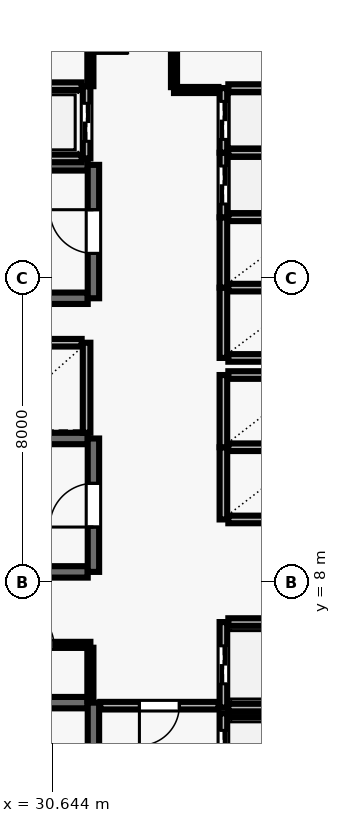
"""IFC4 building model, lengths in metres.
Left out: names, types, materials, properties, quantities, classifications, styles, units other than length and angle.
Written with IfcOpenShell. Run it as: python <this file> out.ifc"""

import sys

from ifc_helpers import new_model, si_unit, direction, frame, frame_2d, origin, place, context, subcontext, project, spatial, rectangle, extrude, element, fill, save


model = new_model("IFC4")
c1 = context("Model", 3, precision=1e-05, world=origin(), true_north=direction((0.0, 1.0)))
c2 = subcontext(c1, "Body", "Model", "MODEL_VIEW")
j1 = project(units=[si_unit("LENGTHUNIT", "METRE"), si_unit("PLANEANGLEUNIT", "RADIAN")], contexts=[c1])
p1 = place(None, origin())
s1 = spatial("IfcSite", under=j1, at=p1, CompositionType="ELEMENT")
p2 = place(p1, origin())
s2 = spatial("IfcBuilding", under=s1, at=p2, CompositionType="ELEMENT")
p3 = place(p2, frame((0.0, 0.0, 146.3)))
s3 = spatial("IfcBuildingStorey", under=s2, at=p3, CompositionType="ELEMENT", Elevation=146.3)
p4 = place(p3, frame((31.58, 4.83, 0.0), z_axis=(0.0, 0.0, 1.0), x_axis=(-1.0, 0.0, 0.0)))
e1 = element("IfcWall", 1, at=p4, inside=s3, PredefinedType="SHEAR", context=c2, shape_type="SweptSolid", body=[
    extrude(rectangle(XDim=8.36, YDim=0.3, at=frame_2d((4.18, 0.0))), origin(), (0.0, 0.0, 1.0), 3.69),
])
p5 = place(p3, frame((31.73, 0.96, 0.0), z_axis=(0.0, 0.0, 1.0), x_axis=(0.0, 1.0, 0.0)))
e2 = element("IfcWall", 2, at=p5, inside=s3, PredefinedType="SHEAR", context=c2, shape_type="SweptSolid", body=[
    extrude(rectangle(XDim=3.87, YDim=0.3, at=frame_2d((1.935, 0.0))), origin(), (0.0, 0.0, 1.0), 3.69),
])
p6 = place(p5, frame((1.54, 0.0, 0.0)))
e3 = element("IfcOpeningElement", 3, at=p6, cuts=e2, PredefinedType="OPENING", context=c2, shape_type="SweptSolid", body=[
    extrude(rectangle(XDim=1.15, YDim=2.15, at=frame_2d((0.575, 1.075))), frame((0.0, 0.16, 0.0), z_axis=(0.0, -1.0, 0.0), x_axis=(1.0, 0.0, 0.0)), (0.0, 0.0, 1.0), 0.32),
])
for number, where, z_axis, x_axis in (
    (4, (31.58, 18.98, 0.0), (0.0, 0.0, 1.0), (-1.0, 0.0, 0.0)),
    (5, (23.22, 15.47, 0.0), (0.0, 0.0, 1.0), (1.0, 0.0, 0.0)),
):
    element("IfcWall", number, at=place(p3, frame(where, z_axis=z_axis, x_axis=x_axis)), inside=s3, PredefinedType="SHEAR", context=c2, shape_type="SweptSolid", body=[
        extrude(rectangle(XDim=8.36, YDim=0.3, at=frame_2d((4.18, 0.0))), origin(), (0.0, 0.0, 1.0), 3.69),
    ])
p7 = place(p3, frame((31.73, 15.47, 0.0), z_axis=(0.0, 0.0, 1.0), x_axis=(0.0, 1.0, 0.0)))
e6 = element("IfcWall", 6, at=p7, inside=s3, PredefinedType="SHEAR", context=c2, shape_type="SweptSolid", body=[
    extrude(rectangle(XDim=3.51, YDim=0.3, at=frame_2d((1.755, 0.0))), origin(), (0.0, 0.0, 1.0), 3.69),
])
p8 = place(p7, frame((1.18, 0.0, 0.0)))
e7 = element("IfcOpeningElement", 7, at=p8, cuts=e6, PredefinedType="OPENING", context=c2, shape_type="SweptSolid", body=[
    extrude(rectangle(XDim=1.15, YDim=2.15, at=frame_2d((0.575, 1.075))), frame((0.0, 0.16, 0.0), z_axis=(0.0, -1.0, 0.0), x_axis=(1.0, 0.0, 0.0)), (0.0, 0.0, 1.0), 0.32),
])
for number, where, z_axis, x_axis in (
    (8, (31.58, 11.78, 0.0), (0.0, 0.0, 1.0), (-1.0, 0.0, 0.0)),
    (9, (23.22, 8.27, 0.0), (0.0, 0.0, 1.0), (1.0, 0.0, 0.0)),
):
    element("IfcWall", number, at=place(p3, frame(where, z_axis=z_axis, x_axis=x_axis)), inside=s3, PredefinedType="SHEAR", context=c2, shape_type="SweptSolid", body=[
        extrude(rectangle(XDim=8.36, YDim=0.3, at=frame_2d((4.18, 0.0))), origin(), (0.0, 0.0, 1.0), 3.69),
    ])
p9 = place(p3, frame((31.73, 8.27, 0.0), z_axis=(0.0, 0.0, 1.0), x_axis=(0.0, 1.0, 0.0)))
e10 = element("IfcWall", 10, at=p9, inside=s3, PredefinedType="SHEAR", context=c2, shape_type="SweptSolid", body=[
    extrude(rectangle(XDim=3.51, YDim=0.3, at=frame_2d((1.755, 0.0))), origin(), (0.0, 0.0, 1.0), 3.69),
])
p10 = place(p9, frame((1.18, 0.0, 0.0)))
e11 = element("IfcOpeningElement", 11, at=p10, cuts=e10, PredefinedType="OPENING", context=c2, shape_type="SweptSolid", body=[
    extrude(rectangle(XDim=1.15, YDim=2.15, at=frame_2d((0.575, 1.075))), frame((0.0, 0.16, 0.0), z_axis=(0.0, -1.0, 0.0), x_axis=(1.0, 0.0, 0.0)), (0.0, 0.0, 1.0), 0.32),
])
p11 = place(p3, frame((35.15, 4.55, 0.0), z_axis=(0.0, 0.0, 1.0), x_axis=(0.0, -1.0, 0.0)))
e12 = element("IfcWall", 12, at=p11, inside=s3, PredefinedType="SOLIDWALL", context=c2, shape_type="SweptSolid", body=[
    extrude(rectangle(XDim=2.1, YDim=0.2, at=frame_2d((1.05, 0.0))), origin(), (0.0, 0.0, 1.0), 3.69),
])
p12 = place(p11, frame((0.45, 0.0, 0.0)))
e13 = element("IfcOpeningElement", 13, at=p12, cuts=e12, PredefinedType="OPENING", context=c2, shape_type="SweptSolid", body=[
    extrude(rectangle(XDim=1.2, YDim=2.15, at=frame_2d((0.6, 1.075))), frame((0.0, 0.11, 0.0), z_axis=(0.0, -1.0, 0.0), x_axis=(1.0, 0.0, 0.0)), (0.0, 0.0, 1.0), 0.22),
])
p13 = place(p3, frame((37.42, 4.55, 0.0), z_axis=(0.0, 0.0, 1.0), x_axis=(-1.0, 0.0, 0.0)))
e14 = element("IfcWall", 14, at=p13, inside=s3, PredefinedType="SOLIDWALL", context=c2, shape_type="SweptSolid", body=[
    extrude(rectangle(XDim=2.14, YDim=0.2, at=frame_2d((1.07, 0.0))), origin(), (0.0, 0.0, 1.0), 3.69),
])
p14 = place(p3, frame((35.15, 6.95, 0.0), z_axis=(0.0, 0.0, 1.0), x_axis=(0.0, -1.0, 0.0)))
e15 = element("IfcWall", 15, at=p14, inside=s3, PredefinedType="SOLIDWALL", context=c2, shape_type="SweptSolid", body=[
    extrude(rectangle(XDim=2.25, YDim=0.2, at=frame_2d((1.125, 0.0))), origin(), (0.0, 0.0, 1.0), 3.69),
])
p15 = place(p14, frame((0.625, 0.0, 0.0)))
e16 = element("IfcOpeningElement", 16, at=p15, cuts=e15, PredefinedType="OPENING", context=c2, shape_type="SweptSolid", body=[
    extrude(rectangle(XDim=1.0, YDim=2.1, at=frame_2d((0.5, 1.05))), frame((0.0, 0.11, 0.0), z_axis=(0.0, -1.0, 0.0), x_axis=(1.0, 0.0, 0.0)), (0.0, 0.0, 1.0), 0.22),
])
for number, where, z_axis, x_axis in (
    (17, (35.28, 4.7, 0.0), (0.0, 0.0, 1.0), (1.0, 0.0, 0.0)),
    (18, (37.42, 6.95, 0.0), (0.0, 0.0, 1.0), (-1.0, 0.0, 0.0)),
):
    element("IfcWall", number, at=place(p3, frame(where, z_axis=z_axis, x_axis=x_axis)), inside=s3, PredefinedType="SOLIDWALL", context=c2, shape_type="SweptSolid", body=[
        extrude(rectangle(XDim=2.14, YDim=0.2, at=frame_2d((1.07, 0.0))), origin(), (0.0, 0.0, 1.0), 3.69),
    ])
p16 = place(p3, frame((35.15, 11.55, 0.0), z_axis=(0.0, 0.0, 1.0), x_axis=(0.0, -1.0, 0.0)))
e19 = element("IfcWall", 19, at=p16, inside=s3, PredefinedType="SOLIDWALL", context=c2, shape_type="SweptSolid", body=[
    extrude(rectangle(XDim=1.9, YDim=0.2, at=frame_2d((0.95, 0.0))), origin(), (0.0, 0.0, 1.0), 3.69),
])
for number, where, z_axis, x_axis in (
    (20, (35.28, 9.65, 0.0), (0.0, 0.0, 1.0), (1.0, 0.0, 0.0)),
    (21, (37.42, 11.55, 0.0), (0.0, 0.0, 1.0), (-1.0, 0.0, 0.0)),
):
    element("IfcWall", number, at=place(p3, frame(where, z_axis=z_axis, x_axis=x_axis)), inside=s3, PredefinedType="SOLIDWALL", context=c2, shape_type="SweptSolid", body=[
        extrude(rectangle(XDim=2.14, YDim=0.2, at=frame_2d((1.07, 0.0))), origin(), (0.0, 0.0, 1.0), 3.69),
    ])
p17 = place(p3, frame((35.15, 13.45, 0.0), z_axis=(0.0, 0.0, 1.0), x_axis=(0.0, -1.0, 0.0)))
e22 = element("IfcWall", 22, at=p17, inside=s3, PredefinedType="SOLIDWALL", context=c2, shape_type="SweptSolid", body=[
    extrude(rectangle(XDim=1.9, YDim=0.2, at=frame_2d((0.95, 0.0))), origin(), (0.0, 0.0, 1.0), 3.69),
])
p18 = place(p3, frame((37.42, 13.45, 0.0), z_axis=(0.0, 0.0, 1.0), x_axis=(-1.0, 0.0, 0.0)))
e23 = element("IfcWall", 23, at=p18, inside=s3, PredefinedType="SOLIDWALL", context=c2, shape_type="SweptSolid", body=[
    extrude(rectangle(XDim=2.14, YDim=0.2, at=frame_2d((1.07, 0.0))), origin(), (0.0, 0.0, 1.0), 3.69),
])
p19 = place(p3, frame((31.55, 11.93, 0.0), z_axis=(0.0, 0.0, 1.0), x_axis=(0.0, 1.0, 0.0)))
e24 = element("IfcWall", 24, at=p19, inside=s3, PredefinedType="SOLIDWALL", context=c2, shape_type="SweptSolid", body=[
    extrude(rectangle(XDim=2.37, YDim=0.2, at=frame_2d((1.185, 0.0))), origin(), (0.0, 0.0, 1.0), 3.69),
])
p20 = place(p3, frame((31.42, 14.3, 0.0), z_axis=(0.0, 0.0, 1.0), x_axis=(-1.0, 0.0, 0.0)))
e25 = element("IfcWall", 25, at=p20, inside=s3, PredefinedType="SOLIDWALL", context=c2, shape_type="SweptSolid", body=[
    extrude(rectangle(XDim=2.44, YDim=0.2, at=frame_2d((1.22, 0.0))), origin(), (0.0, 0.0, 1.0), 3.69),
])
p21 = place(p3, frame((35.15, 15.75, 0.0), z_axis=(0.0, 0.0, 1.0), x_axis=(0.0, -1.0, 0.0)))
e26 = element("IfcWall", 26, at=p21, inside=s3, PredefinedType="SOLIDWALL", context=c2, shape_type="SweptSolid", body=[
    extrude(rectangle(XDim=1.85, YDim=0.2, at=frame_2d((0.925, 0.0))), origin(), (0.0, 0.0, 1.0), 3.69),
])
for number, where, z_axis, x_axis in (
    (27, (35.28, 13.9, 0.0), (0.0, 0.0, 1.0), (1.0, 0.0, 0.0)),
    (28, (37.42, 15.75, 0.0), (0.0, 0.0, 1.0), (-1.0, 0.0, 0.0)),
):
    element("IfcWall", number, at=place(p3, frame(where, z_axis=z_axis, x_axis=x_axis)), inside=s3, PredefinedType="SOLIDWALL", context=c2, shape_type="SweptSolid", body=[
        extrude(rectangle(XDim=2.14, YDim=0.2, at=frame_2d((1.07, 0.0))), origin(), (0.0, 0.0, 1.0), 3.69),
    ])
p22 = place(p3, frame((35.15, 17.6, 0.0), z_axis=(0.0, 0.0, 1.0), x_axis=(0.0, -1.0, 0.0)))
e29 = element("IfcWall", 29, at=p22, inside=s3, PredefinedType="SOLIDWALL", context=c2, shape_type="SweptSolid", body=[
    extrude(rectangle(XDim=1.85, YDim=0.2, at=frame_2d((0.925, 0.0))), origin(), (0.0, 0.0, 1.0), 3.69),
])
p23 = place(p3, frame((37.42, 17.6, 0.0), z_axis=(0.0, 0.0, 1.0), x_axis=(-1.0, 0.0, 0.0)))
e30 = element("IfcWall", 30, at=p23, inside=s3, PredefinedType="SOLIDWALL", context=c2, shape_type="SweptSolid", body=[
    extrude(rectangle(XDim=2.14, YDim=0.2, at=frame_2d((1.07, 0.0))), origin(), (0.0, 0.0, 1.0), 3.69),
])
p24 = place(p3, frame((35.15, 19.3, 0.0), z_axis=(0.0, 0.0, 1.0), x_axis=(0.0, -1.0, 0.0)))
e31 = element("IfcWall", 31, at=p24, inside=s3, PredefinedType="SOLIDWALL", context=c2, shape_type="SweptSolid", body=[
    extrude(rectangle(XDim=1.7, YDim=0.2, at=frame_2d((0.85, 0.0))), origin(), (0.0, 0.0, 1.0), 3.69),
])
p25 = place(p24, frame((0.35, 0.0, 0.0)))
e32 = element("IfcOpeningElement", 32, at=p25, cuts=e31, PredefinedType="OPENING", context=c2, shape_type="SweptSolid", body=[
    extrude(rectangle(XDim=1.0, YDim=2.1, at=frame_2d((0.5, 1.05))), frame((0.0, 0.11, 0.0), z_axis=(0.0, -1.0, 0.0), x_axis=(1.0, 0.0, 0.0)), (0.0, 0.0, 1.0), 0.22),
])
p26 = place(p3, frame((37.42, 19.3, 0.0), z_axis=(0.0, 0.0, 1.0), x_axis=(-1.0, 0.0, 0.0)))
e33 = element("IfcWall", 33, at=p26, inside=s3, PredefinedType="SOLIDWALL", context=c2, shape_type="SweptSolid", body=[
    extrude(rectangle(XDim=2.14, YDim=0.2, at=frame_2d((1.07, 0.0))), origin(), (0.0, 0.0, 1.0), 3.69),
])
p27 = place(p3, frame((35.15, 21.0, 0.0), z_axis=(0.0, 0.0, 1.0), x_axis=(0.0, -1.0, 0.0)))
e34 = element("IfcWall", 34, at=p27, inside=s3, PredefinedType="SOLIDWALL", context=c2, shape_type="SweptSolid", body=[
    extrude(rectangle(XDim=1.7, YDim=0.2, at=frame_2d((0.85, 0.0))), origin(), (0.0, 0.0, 1.0), 3.69),
])
p28 = place(p27, frame((0.35, 0.0, 0.0)))
e35 = element("IfcOpeningElement", 35, at=p28, cuts=e34, PredefinedType="OPENING", context=c2, shape_type="SweptSolid", body=[
    extrude(rectangle(XDim=1.0, YDim=2.1, at=frame_2d((0.5, 1.05))), frame((0.0, 0.11, 0.0), z_axis=(0.0, -1.0, 0.0), x_axis=(1.0, 0.0, 0.0)), (0.0, 0.0, 1.0), 0.22),
])
p29 = place(p3, frame((37.42, 21.0, 0.0), z_axis=(0.0, 0.0, 1.0), x_axis=(-1.0, 0.0, 0.0)))
e36 = element("IfcWall", 36, at=p29, inside=s3, PredefinedType="SOLIDWALL", context=c2, shape_type="SweptSolid", body=[
    extrude(rectangle(XDim=2.14, YDim=0.2, at=frame_2d((1.07, 0.0))), origin(), (0.0, 0.0, 1.0), 3.69),
])
p30 = place(p3, frame((31.55, 19.15, 0.0), z_axis=(0.0, 0.0, 1.0), x_axis=(0.0, 1.0, 0.0)))
e37 = element("IfcWall", 37, at=p30, inside=s3, PredefinedType="SOLIDWALL", context=c2, shape_type="SweptSolid", body=[
    extrude(rectangle(XDim=1.9, YDim=0.2, at=frame_2d((0.95, 0.0))), origin(), (0.0, 0.0, 1.0), 3.69),
])
p31 = place(p30, frame((0.45, 0.0, 0.0)))
e38 = element("IfcOpeningElement", 38, at=p31, cuts=e37, PredefinedType="OPENING", context=c2, shape_type="SweptSolid", body=[
    extrude(rectangle(XDim=1.0, YDim=2.1, at=frame_2d((0.5, 1.05))), frame((0.0, 0.11, 0.0), z_axis=(0.0, -1.0, 0.0), x_axis=(1.0, 0.0, 0.0)), (0.0, 0.0, 1.0), 0.22),
])
for number, where, z_axis, x_axis in (
    (39, (28.98, 19.15, 0.0), (0.0, 0.0, 1.0), (1.0, 0.0, 0.0)),
    (40, (31.42, 21.05, 0.0), (0.0, 0.0, 1.0), (-1.0, 0.0, 0.0)),
):
    element("IfcWall", number, at=place(p3, frame(where, z_axis=z_axis, x_axis=x_axis)), inside=s3, PredefinedType="SOLIDWALL", context=c2, shape_type="SweptSolid", body=[
        extrude(rectangle(XDim=2.44, YDim=0.2, at=frame_2d((1.22, 0.0))), origin(), (0.0, 0.0, 1.0), 3.69),
    ])
p32 = place(p3, frame((28.85, 6.35, 0.0), z_axis=(0.0, 0.0, 1.0), x_axis=(1.0, 0.0, 0.0)))
e41 = element("IfcWall", 41, at=p32, inside=s3, PredefinedType="PARTITIONING", context=c2, shape_type="SweptSolid", body=[
    extrude(rectangle(XDim=2.8, YDim=0.16, at=frame_2d((1.4, 0.0))), origin(), (0.0, 0.0, 1.0), 3.69),
])
p33 = place(p32, frame((0.96, 0.0, 0.0)))
e42 = element("IfcOpeningElement", 42, at=p33, cuts=e41, PredefinedType="OPENING", context=c2, shape_type="SweptSolid", body=[
    extrude(rectangle(XDim=0.88, YDim=2.1, at=frame_2d((0.44, 1.05))), frame((0.0, 0.09, 0.0), z_axis=(0.0, -1.0, 0.0), x_axis=(1.0, 0.0, 0.0)), (0.0, 0.0, 1.0), 0.18),
])
p34 = place(p3, frame((35.02, 4.75, 0.0), z_axis=(0.0, 0.0, 1.0), x_axis=(-1.0, 0.0, 0.0)))
e43 = element("IfcWall", 43, at=p34, inside=s3, PredefinedType="SOLIDWALL", context=c2, shape_type="SweptSolid", body=[
    extrude(rectangle(XDim=3.11, YDim=0.2, at=frame_2d((1.555, 0.0))), origin(), (0.0, 0.0, 1.0), 3.69),
])
p35 = place(p34, frame((1.03, 0.0, 0.0)))
e44 = element("IfcOpeningElement", 44, at=p35, cuts=e43, PredefinedType="OPENING", context=c2, shape_type="SweptSolid", body=[
    extrude(rectangle(XDim=1.05, YDim=2.15, at=frame_2d((0.525, 1.075))), frame((0.0, 0.11, 0.0), z_axis=(0.0, -1.0, 0.0), x_axis=(1.0, 0.0, 0.0)), (0.0, 0.0, 1.0), 0.22),
])
p36 = place(p3, frame((35.02, 20.95, 0.0), z_axis=(0.0, 0.0, 1.0), x_axis=(-1.0, 0.0, 0.0)))
e45 = element("IfcWall", 45, at=p36, inside=s3, PredefinedType="PARTITIONING", context=c2, shape_type="SweptSolid", body=[
    extrude(rectangle(XDim=1.17, YDim=0.16, at=frame_2d((0.585, 0.0))), origin(), (0.0, 0.0, 1.0), 3.69),
])
p37 = place(p3, frame((31.65, 4.86, 0.0), z_axis=(0.0, 0.0, 1.0), x_axis=(0.0, 1.0, 0.0)))
e46 = element("IfcWall", 46, at=p37, inside=s3, PredefinedType="PARTITIONING", context=c2, shape_type="SweptSolid", body=[
    extrude(rectangle(XDim=1.415, YDim=0.16, at=frame_2d((0.708, 0.0))), origin(), (0.0, 0.0, 1.0), 3.69),
])
p38 = place(p3, frame((31.65, 23.775, 0.0), z_axis=(0.0, 0.0, 1.0), x_axis=(0.0, -1.0, 0.0)))
e47 = element("IfcWall", 47, at=p38, inside=s3, PredefinedType="PARTITIONING", context=c2, shape_type="SweptSolid", body=[
    extrude(rectangle(XDim=2.725, YDim=0.16, at=frame_2d((1.362, 0.0))), origin(), (0.0, 0.0, 1.0), 3.69),
])
p39 = place(p38, frame((0.862, 0.0, 0.0)))
e48 = element("IfcOpeningElement", 48, at=p39, cuts=e47, PredefinedType="OPENING", context=c2, shape_type="SweptSolid", body=[
    extrude(rectangle(XDim=1.0, YDim=2.1, at=frame_2d((0.5, 1.05))), frame((0.0, 0.09, 0.0), z_axis=(0.0, -1.0, 0.0), x_axis=(1.0, 0.0, 0.0)), (0.0, 0.0, 1.0), 0.18),
])
p40 = place(p3, frame((33.85, 21.025, 0.0), z_axis=(0.0, 0.0, 1.0), x_axis=(0.0, 1.0, 0.0)))
e49 = element("IfcWall", 49, at=p40, inside=s3, PredefinedType="PARTITIONING", context=c2, shape_type="SweptSolid", body=[
    extrude(rectangle(XDim=2.75, YDim=0.16, at=frame_2d((1.375, 0.0))), origin(), (0.0, 0.0, 1.0), 3.69),
])
p41 = place(p8, origin())
e50 = element("IfcDoor", 50, at=p41, inside=s3, OperationType="SINGLE_SWING_RIGHT", PredefinedType="DOOR", context=c2, shape_type="SweptSolid", body=[
    extrude(rectangle(XDim=1.15, YDim=2.15, at=frame_2d((0.575, 1.075))), frame((0.0, 0.025, 0.0), z_axis=(0.0, -1.0, 0.0), x_axis=(1.0, 0.0, 0.0)), (0.0, 0.0, 1.0), 0.05),
])
fill(e7, e50)
p42 = place(p10, origin())
e51 = element("IfcDoor", 51, at=p42, inside=s3, OperationType="SINGLE_SWING_LEFT", PredefinedType="DOOR", context=c2, shape_type="SweptSolid", body=[
    extrude(rectangle(XDim=1.15, YDim=2.15, at=frame_2d((0.575, 1.075))), frame((0.0, 0.025, 0.0), z_axis=(0.0, -1.0, 0.0), x_axis=(1.0, 0.0, 0.0)), (0.0, 0.0, 1.0), 0.05),
])
fill(e11, e51)
p43 = place(p12, origin())
e52 = element("IfcDoor", 52, at=p43, inside=s3, OperationType="DOUBLE_DOOR_SLIDING", PredefinedType="DOOR", context=c2, shape_type="SweptSolid", body=[
    extrude(rectangle(XDim=1.2, YDim=2.15, at=frame_2d((0.6, 1.075))), frame((0.0, 0.025, 0.0), z_axis=(0.0, -1.0, 0.0), x_axis=(1.0, 0.0, 0.0)), (0.0, 0.0, 1.0), 0.05),
])
fill(e13, e52)
p44 = place(p15, origin())
e53 = element("IfcDoor", 53, at=p44, inside=s3, OperationType="DOUBLE_DOOR_SLIDING", PredefinedType="DOOR", context=c2, shape_type="SweptSolid", body=[
    extrude(rectangle(XDim=1.0, YDim=2.1, at=frame_2d((0.5, 1.05))), frame((0.0, 0.025, 0.0), z_axis=(0.0, -1.0, 0.0), x_axis=(1.0, 0.0, 0.0)), (0.0, 0.0, 1.0), 0.05),
])
fill(e16, e53)
p45 = place(p25, origin())
e54 = element("IfcDoor", 54, at=p45, inside=s3, OperationType="DOUBLE_DOOR_SLIDING", PredefinedType="DOOR", context=c2, shape_type="SweptSolid", body=[
    extrude(rectangle(XDim=1.0, YDim=2.1, at=frame_2d((0.5, 1.05))), frame((0.0, 0.025, 0.0), z_axis=(0.0, -1.0, 0.0), x_axis=(1.0, 0.0, 0.0)), (0.0, 0.0, 1.0), 0.05),
])
fill(e32, e54)
p46 = place(p28, origin())
e55 = element("IfcDoor", 55, at=p46, inside=s3, OperationType="DOUBLE_DOOR_SLIDING", PredefinedType="DOOR", context=c2, shape_type="SweptSolid", body=[
    extrude(rectangle(XDim=1.0, YDim=2.1, at=frame_2d((0.5, 1.05))), frame((0.0, 0.025, 0.0), z_axis=(0.0, -1.0, 0.0), x_axis=(1.0, 0.0, 0.0)), (0.0, 0.0, 1.0), 0.05),
])
fill(e35, e55)
p47 = place(p31, origin())
e56 = element("IfcDoor", 56, at=p47, inside=s3, OperationType="DOUBLE_DOOR_SLIDING", PredefinedType="DOOR", context=c2, shape_type="SweptSolid", body=[
    extrude(rectangle(XDim=1.0, YDim=2.1, at=frame_2d((0.5, 1.05))), frame((0.0, 0.025, 0.0), z_axis=(0.0, -1.0, 0.0), x_axis=(1.0, 0.0, 0.0)), (0.0, 0.0, 1.0), 0.05),
])
fill(e38, e56)
p48 = place(p35, origin())
e57 = element("IfcDoor", 57, at=p48, inside=s3, OperationType="SINGLE_SWING_RIGHT", PredefinedType="DOOR", context=c2, shape_type="SweptSolid", body=[
    extrude(rectangle(XDim=1.05, YDim=2.15, at=frame_2d((0.525, 1.075))), frame((0.0, 0.025, 0.0), z_axis=(0.0, -1.0, 0.0), x_axis=(1.0, 0.0, 0.0)), (0.0, 0.0, 1.0), 0.05),
])
fill(e44, e57)
p49 = place(p39, origin())
e58 = element("IfcDoor", 58, at=p49, inside=s3, OperationType="SINGLE_SWING_RIGHT", PredefinedType="DOOR", context=c2, shape_type="SweptSolid", body=[
    extrude(rectangle(XDim=1.0, YDim=2.1, at=frame_2d((0.5, 1.05))), frame((0.0, 0.025, 0.0), z_axis=(0.0, -1.0, 0.0), x_axis=(1.0, 0.0, 0.0)), (0.0, 0.0, 1.0), 0.05),
])
fill(e48, e58)
p50 = place(p33, origin())
e59 = element("IfcDoor", 59, at=p50, inside=s3, OperationType="SINGLE_SWING_LEFT", PredefinedType="DOOR", context=c2, shape_type="SweptSolid", body=[
    extrude(rectangle(XDim=0.88, YDim=2.1, at=frame_2d((0.44, 1.05))), frame((0.0, 0.025, 0.0), z_axis=(0.0, -1.0, 0.0), x_axis=(1.0, 0.0, 0.0)), (0.0, 0.0, 1.0), 0.05),
])
fill(e42, e59)
save(model, sys.argv[1])
